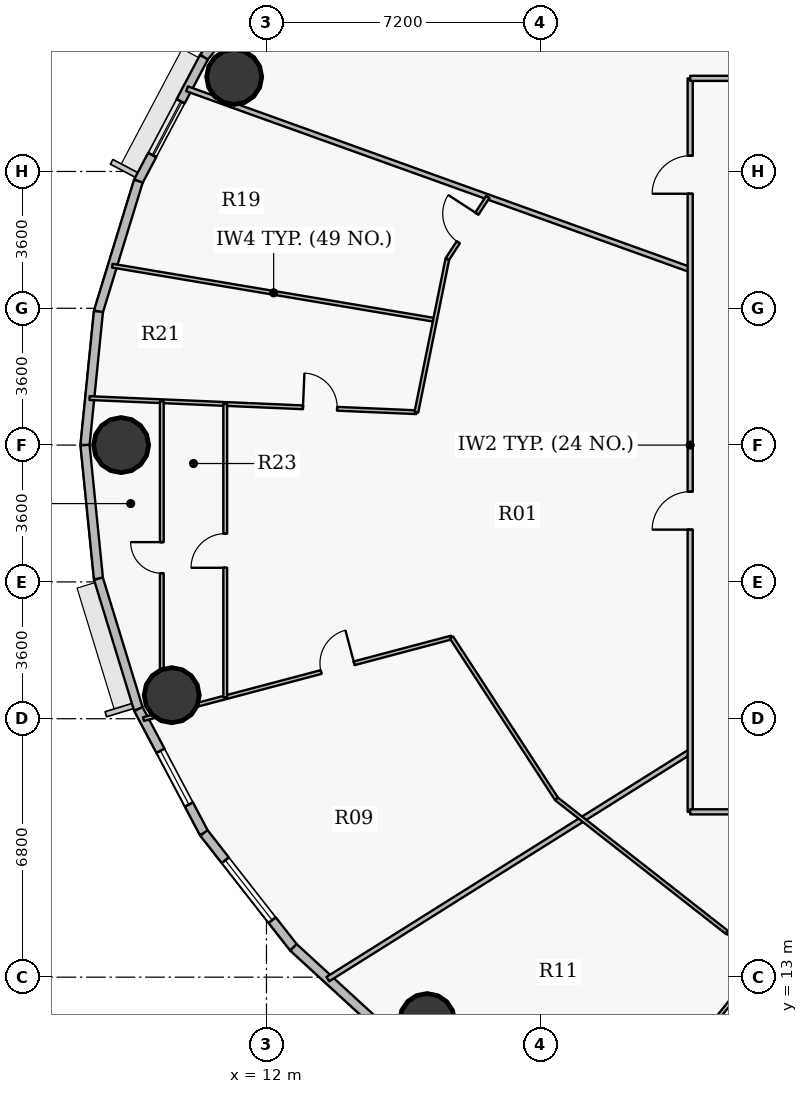
"""IFC4 building model, lengths in metres.
Left out: names, types, materials, properties, quantities, classifications, styles, units other than length and angle.
Written with IfcOpenShell. Run it as: python <this file> out.ifc"""

import sys

from ifc_helpers import new_model, si_unit, direction, frame, frame_2d, origin, origin_2d, place, context, subcontext, project, spatial, rectangle, hollow_circle, extrude, source, transform, mapped, element, fill, save


model = new_model("IFC4")
c1 = context("Model", 3, precision=1e-05, world=origin(), true_north=direction((0.0, 1.0)))
c2 = subcontext(c1, "Body", "Model", "MODEL_VIEW")
j1 = project(units=[si_unit("LENGTHUNIT", "METRE"), si_unit("PLANEANGLEUNIT", "RADIAN")], contexts=[c1])
p1 = place(None, origin())
s1 = spatial("IfcSite", under=j1, at=p1, CompositionType="ELEMENT")
p2 = place(p1, origin())
s2 = spatial("IfcBuilding", under=s1, at=p2, CompositionType="ELEMENT")
p3 = place(p2, frame((0.0, 0.0, 123.45)))
s3 = spatial("IfcBuildingStorey", under=s2, at=p3, CompositionType="ELEMENT", Elevation=123.45)
for number, where, z_axis, x_axis in (
    (1, (11.151, 36.688, 0.0), (0.0, 0.0, 1.0), (1.0, 0.0, 0.0)),
    (2, (8.175, 27.0, 0.0), (0.0, 0.0, 1.0), (1.0, 0.0, 0.0)),
    (3, (9.507, 20.419, 0.0), (0.0, 0.0, 1.0), (1.0, 0.0, 0.0)),
    (4, (16.227, 11.844, 0.0), (0.0, 0.0, 1.0), (1.0, 0.0, 0.0)),
):
    element("IfcColumn", number, at=place(p3, frame(where, z_axis=z_axis, x_axis=x_axis)), inside=s3, PredefinedType="COLUMN", context=c2, shape_type="SweptSolid", body=[
        extrude(hollow_circle(Radius=0.725, WallThickness=0.042, at=origin_2d()), origin(), (0.0, 0.0, 1.0), 3.75),
    ])
p4 = place(p3, frame((10.355, 37.206, 0.0), z_axis=(0.0, 0.0, 1.0), x_axis=(0.616272103517, 0.787533297345, 0.0)))
e5 = element("IfcWall", 5, at=p4, inside=s3, PredefinedType="SOLIDWALL", context=c2, shape_type="SweptSolid", body=[
    extrude(rectangle(XDim=3.823, YDim=0.24, at=frame_2d((1.912, 0.0))), origin(), (0.0, 0.0, 1.0), 3.5),
])
p5 = place(p3, frame((8.63, 33.945, 0.0), z_axis=(0.0, 0.0, 1.0), x_axis=(0.467614004126, 0.883932770716, 0.0)))
e6 = element("IfcWall", 6, at=p5, inside=s3, PredefinedType="SOLIDWALL", context=c2, shape_type="SweptSolid", body=[
    extrude(rectangle(XDim=3.689, YDim=0.24, at=frame_2d((1.844, 0.0))), origin(), (0.0, 0.0, 1.0), 3.5),
])
p6 = place(p5, frame((0.778, 0.0, 0.9)))
e7 = element("IfcOpeningElement", 7, at=p6, cuts=e6, PredefinedType="OPENING", context=c2, shape_type="SweptSolid", body=[
    extrude(rectangle(XDim=1.6, YDim=1.75, at=origin_2d()), frame((0.8, 0.13, 0.875), z_axis=(0.0, -1.0, 0.0), x_axis=(1.0, 0.0, 0.0)), (0.0, 0.0, 1.0), 0.26),
])
p7 = place(p3, frame((7.578, 30.515, 0.0), z_axis=(0.0, 0.0, 1.0), x_axis=(0.293124431344, 0.956074300329, 0.0)))
e8 = element("IfcWall", 8, at=p7, inside=s3, PredefinedType="SOLIDWALL", context=c2, shape_type="SweptSolid", body=[
    extrude(rectangle(XDim=3.587, YDim=0.24, at=frame_2d((1.793, 0.0))), origin(), (0.0, 0.0, 1.0), 3.5),
])
for number, where, z_axis, x_axis in (
    (9, (7.225, 27.0, 0.0), (0.0, 0.0, 1.0), (0.1, 0.995, 0.0)),
    (10, (7.578, 23.485, 0.0), (0.0, 0.0, 1.0), (-0.1, 0.995, 0.0)),
):
    element("IfcWall", number, at=place(p3, frame(where, z_axis=z_axis, x_axis=x_axis)), inside=s3, PredefinedType="SOLIDWALL", context=c2, shape_type="SweptSolid", body=[
        extrude(rectangle(XDim=3.533, YDim=0.24, at=frame_2d((1.767, 0.0))), origin(), (0.0, 0.0, 1.0), 3.5),
    ])
p8 = place(p3, frame((8.63, 20.055, 0.0), z_axis=(0.0, 0.0, 1.0), x_axis=(-0.293124431344, 0.956074300329, 0.0)))
e11 = element("IfcWall", 11, at=p8, inside=s3, PredefinedType="SOLIDWALL", context=c2, shape_type="SweptSolid", body=[
    extrude(rectangle(XDim=3.587, YDim=0.24, at=frame_2d((1.793, 0.0))), origin(), (0.0, 0.0, 1.0), 3.5),
])
p9 = place(p3, frame((10.355, 16.794, 0.0), z_axis=(0.0, 0.0, 1.0), x_axis=(-0.467614004126, 0.883932770716, 0.0)))
e12 = element("IfcWall", 12, at=p9, inside=s3, PredefinedType="SOLIDWALL", context=c2, shape_type="SweptSolid", body=[
    extrude(rectangle(XDim=3.689, YDim=0.24, at=frame_2d((1.844, 0.0))), origin(), (0.0, 0.0, 1.0), 3.5),
])
p10 = place(p9, frame((0.846, 0.0, 0.9)))
e13 = element("IfcOpeningElement", 13, at=p10, cuts=e12, PredefinedType="OPENING", context=c2, shape_type="SweptSolid", body=[
    extrude(rectangle(XDim=1.6, YDim=1.75, at=origin_2d()), frame((0.8, 0.13, 0.875), z_axis=(0.0, -1.0, 0.0), x_axis=(1.0, 0.0, 0.0)), (0.0, 0.0, 1.0), 0.26),
])
p11 = place(p3, frame((12.711, 13.783, 0.0), z_axis=(0.0, 0.0, 1.0), x_axis=(-0.616272103517, 0.787533297345, 0.0)))
e14 = element("IfcWall", 14, at=p11, inside=s3, PredefinedType="SOLIDWALL", context=c2, shape_type="SweptSolid", body=[
    extrude(rectangle(XDim=3.823, YDim=0.24, at=frame_2d((1.912, 0.0))), origin(), (0.0, 0.0, 1.0), 3.5),
])
p12 = place(p11, frame((0.912, 0.0, 0.9)))
e15 = element("IfcOpeningElement", 15, at=p12, cuts=e14, PredefinedType="OPENING", context=c2, shape_type="SweptSolid", body=[
    extrude(rectangle(XDim=2.0, YDim=1.75, at=origin_2d()), frame((1.0, 0.13, 0.875), z_axis=(0.0, -1.0, 0.0), x_axis=(1.0, 0.0, 0.0)), (0.0, 0.0, 1.0), 0.26),
])
p13 = place(p3, frame((15.642, 11.097, 0.0), z_axis=(0.0, 0.0, 1.0), x_axis=(-0.737113356241, 0.675769117414, 0.0)))
e16 = element("IfcWall", 16, at=p13, inside=s3, PredefinedType="SOLIDWALL", context=c2, shape_type="SweptSolid", body=[
    extrude(rectangle(XDim=3.976, YDim=0.24, at=frame_2d((1.988, 0.0))), origin(), (0.0, 0.0, 1.0), 3.5),
])
p14 = place(p3, frame((7.344, 28.236, 0.0), z_axis=(0.0, 0.0, 1.0), x_axis=(0.9990704445, -0.043107388317, 0.0)))
e17 = element("IfcWall", 17, at=p14, inside=s3, PredefinedType="PARTITIONING", context=c2, shape_type="SweptSolid", body=[
    extrude(rectangle(XDim=8.609, YDim=0.1, at=frame_2d((4.304, 0.0))), origin(), (0.0, 0.0, 1.0), 2.935),
])
p15 = place(p14, frame((5.621, 0.0, 0.0)))
e18 = element("IfcOpeningElement", 18, at=p15, cuts=e17, PredefinedType="OPENING", context=c2, shape_type="SweptSolid", body=[
    extrude(rectangle(XDim=0.9, YDim=2.1, at=origin_2d()), frame((0.45, 0.06, 1.05), z_axis=(0.0, -1.0, 0.0), x_axis=(1.0, 0.0, 0.0)), (0.0, 0.0, 1.0), 0.12),
])
p16 = place(p3, frame((7.943, 31.721, 0.0), z_axis=(0.0, 0.0, 1.0), x_axis=(0.986139151265, -0.165920385556, 0.0)))
e19 = element("IfcWall", 19, at=p16, inside=s3, PredefinedType="PARTITIONING", context=c2, shape_type="SweptSolid", body=[
    extrude(rectangle(XDim=8.612, YDim=0.1, at=frame_2d((4.306, 0.0))), origin(), (0.0, 0.0, 1.0), 2.935),
])
p17 = place(p3, frame((8.763, 19.792, 0.0), z_axis=(0.0, 0.0, 1.0), x_axis=(0.96671793708, 0.255844542893, 0.0)))
e20 = element("IfcWall", 20, at=p17, inside=s3, PredefinedType="PARTITIONING", context=c2, shape_type="SweptSolid", body=[
    extrude(rectangle(XDim=8.385, YDim=0.1, at=frame_2d((4.192, 0.0))), origin(), (0.0, 0.0, 1.0), 2.935),
])
p18 = place(p17, frame((4.835, 0.0, 0.0)))
e21 = element("IfcOpeningElement", 21, at=p18, cuts=e20, PredefinedType="OPENING", context=c2, shape_type="SweptSolid", body=[
    extrude(rectangle(XDim=0.9, YDim=2.1, at=origin_2d()), frame((0.45, 0.06, 1.05), z_axis=(0.0, -1.0, 0.0), x_axis=(1.0, 0.0, 0.0)), (0.0, 0.0, 1.0), 0.12),
])
p19 = place(p3, frame((9.246, 19.919, 0.0), z_axis=(0.0, 0.0, 1.0), x_axis=(0.0, 1.0, 0.0)))
e22 = element("IfcWall", 22, at=p19, inside=s3, PredefinedType="PARTITIONING", context=c2, shape_type="SweptSolid", body=[
    extrude(rectangle(XDim=8.235, YDim=0.1, at=frame_2d((4.117, 0.0))), origin(), (0.0, 0.0, 1.0), 2.935),
])
p20 = place(p19, frame((3.708, 0.0, 0.0)))
e23 = element("IfcOpeningElement", 23, at=p20, cuts=e22, PredefinedType="OPENING", context=c2, shape_type="SweptSolid", body=[
    extrude(rectangle(XDim=0.82, YDim=2.1, at=origin_2d()), frame((0.41, 0.06, 1.05), z_axis=(0.0, -1.0, 0.0), x_axis=(1.0, 0.0, 0.0)), (0.0, 0.0, 1.0), 0.12),
])
p21 = place(p3, frame((9.91, 36.375, 0.0), z_axis=(0.0, 0.0, 1.0), x_axis=(0.941089213164, -0.338158384292, 0.0)))
e24 = element("IfcWall", 24, at=p21, inside=s3, PredefinedType="PARTITIONING", context=c2, shape_type="SweptSolid", body=[
    extrude(rectangle(XDim=14.069, YDim=0.135, at=frame_2d((7.035, 0.0))), origin(), (0.0, 0.0, 1.0), 2.935),
])
p22 = place(p3, frame((10.915, 20.361, 0.0), z_axis=(0.0, 0.0, 1.0), x_axis=(0.0, 1.0, 0.0)))
e25 = element("IfcWall", 25, at=p22, inside=s3, PredefinedType="PARTITIONING", context=c2, shape_type="SweptSolid", body=[
    extrude(rectangle(XDim=7.721, YDim=0.1, at=frame_2d((3.861, 0.0))), origin(), (0.0, 0.0, 1.0), 2.935),
])
p23 = place(p22, frame((3.411, 0.0, 0.0)))
e26 = element("IfcOpeningElement", 26, at=p23, cuts=e25, PredefinedType="OPENING", context=c2, shape_type="SweptSolid", body=[
    extrude(rectangle(XDim=0.9, YDim=2.1, at=origin_2d()), frame((0.45, 0.06, 1.05), z_axis=(0.0, -1.0, 0.0), x_axis=(1.0, 0.0, 0.0)), (0.0, 0.0, 1.0), 0.12),
])
p24 = place(p3, frame((13.615, 12.948, 0.0), z_axis=(0.0, 0.0, 1.0), x_axis=(0.846963568038, 0.531650932866, 0.0)))
e27 = element("IfcWall", 27, at=p24, inside=s3, PredefinedType="PARTITIONING", context=c2, shape_type="SweptSolid", body=[
    extrude(rectangle(XDim=11.258, YDim=0.135, at=frame_2d((5.629, 0.0))), origin(), (0.0, 0.0, 1.0), 2.935),
])
p25 = place(p3, frame((15.945, 27.865, 0.0), z_axis=(0.0, 0.0, 1.0), x_axis=(0.198216891741, 0.980158183065, 0.0)))
e28 = element("IfcWall", 28, at=p25, inside=s3, PredefinedType="PARTITIONING", context=c2, shape_type="SweptSolid", body=[
    extrude(rectangle(XDim=4.111, YDim=0.1, at=frame_2d((2.056, 0.0))), origin(), (0.0, 0.0, 1.0), 3.5),
])
p26 = place(p3, frame((16.76, 31.895, 0.0), z_axis=(0.0, 0.0, 1.0), x_axis=(0.545370803514, 0.838194897786, 0.0)))
e29 = element("IfcWall", 29, at=p26, inside=s3, PredefinedType="PARTITIONING", context=c2, shape_type="SweptSolid", body=[
    extrude(rectangle(XDim=1.952, YDim=0.1, at=frame_2d((0.976, 0.0))), origin(), (0.0, 0.0, 1.0), 3.5),
])
p27 = place(p26, frame((0.526, 0.0, 0.0)))
e30 = element("IfcOpeningElement", 30, at=p27, cuts=e29, PredefinedType="OPENING", context=c2, shape_type="SweptSolid", body=[
    extrude(rectangle(XDim=0.9, YDim=2.1, at=origin_2d()), frame((0.45, 0.06, 1.05), z_axis=(0.0, -1.0, 0.0), x_axis=(1.0, 0.0, 0.0)), (0.0, 0.0, 1.0), 0.12),
])
p28 = place(p3, frame((16.869, 21.937, 0.0), z_axis=(0.0, 0.0, 1.0), x_axis=(0.545394651961, -0.838179380331, 0.0)))
e31 = element("IfcWall", 31, at=p28, inside=s3, PredefinedType="PARTITIONING", context=c2, shape_type="SweptSolid", body=[
    extrude(rectangle(XDim=5.068, YDim=0.1, at=frame_2d((2.534, 0.0))), origin(), (0.0, 0.0, 1.0), 3.5),
])
p29 = place(p3, frame((19.634, 17.689, 0.0), z_axis=(0.0, 0.0, 1.0), x_axis=(0.787333679705, -0.616527109544, 0.0)))
e32 = element("IfcWall", 32, at=p29, inside=s3, PredefinedType="PARTITIONING", context=c2, shape_type="SweptSolid", body=[
    extrude(rectangle(XDim=5.685, YDim=0.1, at=frame_2d((2.842, 0.0))), origin(), (0.0, 0.0, 1.0), 2.935),
])
p30 = place(p3, frame((20.717, 8.007, 0.0), z_axis=(0.0, 0.0, 1.0), x_axis=(0.626926430663, 0.779078462375, 0.0)))
e33 = element("IfcWall", 33, at=p30, inside=s3, PredefinedType="PARTITIONING", context=c2, shape_type="SweptSolid", body=[
    extrude(rectangle(XDim=7.317, YDim=0.1, at=frame_2d((3.658, 0.0))), origin(), (0.0, 0.0, 1.0), 2.935),
])
p31 = place(p30, frame((3.208, 0.0, 0.0)))
e34 = element("IfcOpeningElement", 34, at=p31, cuts=e33, PredefinedType="OPENING", context=c2, shape_type="SweptSolid", body=[
    extrude(rectangle(XDim=0.9, YDim=2.1, at=origin_2d()), frame((0.45, 0.06, 1.05), z_axis=(0.0, -1.0, 0.0), x_axis=(1.0, 0.0, 0.0)), (0.0, 0.0, 1.0), 0.12),
])
p32 = place(p3, frame((23.15, 17.35, 0.0), z_axis=(0.0, 0.0, 1.0), x_axis=(0.0, 1.0, 0.0)))
e35 = element("IfcWall", 35, at=p32, inside=s3, PredefinedType="PARTITIONING", context=c2, shape_type="SweptSolid", body=[
    extrude(rectangle(XDim=19.3, YDim=0.135, at=frame_2d((9.65, 0.0))), origin(), (0.0, 0.0, 1.0), 2.935),
])
p33 = place(p32, frame((16.264, 0.0, 0.0)))
e36 = element("IfcOpeningElement", 36, at=p33, cuts=e35, PredefinedType="OPENING", context=c2, shape_type="SweptSolid", body=[
    extrude(rectangle(XDim=1.0, YDim=2.15, at=origin_2d()), frame((0.5, 0.078, 1.075), z_axis=(0.0, -1.0, 0.0), x_axis=(1.0, 0.0, 0.0)), (0.0, 0.0, 1.0), 0.155),
])
p34 = place(p32, frame((7.426, 0.0, 0.0)))
e37 = element("IfcOpeningElement", 37, at=p34, cuts=e35, PredefinedType="OPENING", context=c2, shape_type="SweptSolid", body=[
    extrude(rectangle(XDim=1.0, YDim=2.15, at=origin_2d()), frame((0.5, 0.078, 1.075), z_axis=(0.0, -1.0, 0.0), x_axis=(1.0, 0.0, 0.0)), (0.0, 0.0, 1.0), 0.155),
])
p35 = place(p3, frame((23.15, 17.35, 0.0), z_axis=(0.0, 0.0, 1.0), x_axis=(1.0, 0.0, 0.0)))
e38 = element("IfcWall", 38, at=p35, inside=s3, PredefinedType="PARTITIONING", context=c2, shape_type="SweptSolid", body=[
    extrude(rectangle(XDim=10.619, YDim=0.135, at=frame_2d((5.31, 0.0))), origin(), (0.0, 0.0, 1.0), 2.935),
])
p36 = place(p35, frame((4.211, 0.0, 0.0)))
e39 = element("IfcOpeningElement", 39, at=p36, cuts=e38, PredefinedType="OPENING", context=c2, shape_type="SweptSolid", body=[
    extrude(rectangle(XDim=1.0, YDim=2.15, at=origin_2d()), frame((0.5, 0.078, 1.075), z_axis=(0.0, -1.0, 0.0), x_axis=(1.0, 0.0, 0.0)), (0.0, 0.0, 1.0), 0.155),
])
p37 = place(p3, frame((23.15, 36.65, 0.0), z_axis=(0.0, 0.0, 1.0), x_axis=(1.0, 0.0, 0.0)))
e40 = element("IfcWall", 40, at=p37, inside=s3, PredefinedType="PARTITIONING", context=c2, shape_type="SweptSolid", body=[
    extrude(rectangle(XDim=10.612, YDim=0.135, at=frame_2d((5.306, 0.0))), origin(), (0.0, 0.0, 1.0), 2.935),
])
p38 = place(p37, frame((8.182, 0.0, 0.0)))
e41 = element("IfcOpeningElement", 41, at=p38, cuts=e40, PredefinedType="OPENING", context=c2, shape_type="SweptSolid", body=[
    extrude(rectangle(XDim=1.0, YDim=2.15, at=origin_2d()), frame((0.5, 0.078, 1.075), z_axis=(0.0, -1.0, 0.0), x_axis=(1.0, 0.0, 0.0)), (0.0, 0.0, 1.0), 0.155),
])
p39 = place(p3, frame((23.33, 47.184, 0.0), z_axis=(0.0, 0.0, 1.0), x_axis=(0.531660079213, -0.846957826678, 0.0)))
e42 = element("IfcWall", 42, at=p39, inside=s3, PredefinedType="PARTITIONING", context=c2, shape_type="SweptSolid", body=[
    extrude(rectangle(XDim=12.437, YDim=0.135, at=frame_2d((6.219, 0.0))), origin(), (0.0, 0.0, 1.0), 2.935),
])
p40 = place(p3, frame((24.109, 14.184, 0.0), z_axis=(0.0, 0.0, 1.0), x_axis=(0.928816677888, -0.370539578017, 0.0)))
e43 = element("IfcWall", 43, at=p40, inside=s3, PredefinedType="PARTITIONING", context=c2, shape_type="SweptSolid", body=[
    extrude(rectangle(XDim=1.286, YDim=0.1, at=frame_2d((0.643, 0.0))), origin(), (0.0, 0.0, 1.0), 3.085),
])
m1 = source(origin(), c2, "Body", "SweptSolid", [
    extrude(rectangle(XDim=1.6, YDim=1.75, at=origin_2d()), frame((0.8, 0.03, 0.875), z_axis=(0.0, -1.0, 0.0), x_axis=(1.0, 0.0, 0.0)), (0.0, 0.0, 1.0), 0.06),
])
p41 = place(p6, origin())
e44 = element("IfcWindow", 44, at=p41, inside=s3, PartitioningType="DOUBLE_PANEL_VERTICAL", PredefinedType="WINDOW", context=c2, shape_type="MappedRepresentation", body=[
    mapped(m1, transform((0.0, 0.0, 0.0), x_axis=(1.0, 0.0, 0.0), y_axis=(0.0, 1.0, 0.0), z_axis=(0.0, 0.0, 1.0), scale=1.0)),
])
fill(e7, e44)
p42 = place(p10, origin())
e45 = element("IfcWindow", 45, at=p42, inside=s3, PartitioningType="DOUBLE_PANEL_VERTICAL", PredefinedType="WINDOW", context=c2, shape_type="MappedRepresentation", body=[
    mapped(m1, transform((0.0, 0.0, 0.0), x_axis=(1.0, 0.0, 0.0), y_axis=(0.0, 1.0, 0.0), z_axis=(0.0, 0.0, 1.0), scale=1.0)),
])
fill(e13, e45)
m2 = source(origin(), c2, "Body", "SweptSolid", [
    extrude(rectangle(XDim=2.0, YDim=1.75, at=origin_2d()), frame((1.0, 0.03, 0.875), z_axis=(0.0, -1.0, 0.0), x_axis=(1.0, 0.0, 0.0)), (0.0, 0.0, 1.0), 0.06),
])
p43 = place(p12, origin())
e46 = element("IfcWindow", 46, at=p43, inside=s3, PartitioningType="DOUBLE_PANEL_VERTICAL", PredefinedType="WINDOW", context=c2, shape_type="MappedRepresentation", body=[
    mapped(m2, transform((0.0, 0.0, 0.0), x_axis=(1.0, 0.0, 0.0), y_axis=(0.0, 1.0, 0.0), z_axis=(0.0, 0.0, 1.0), scale=1.0)),
])
fill(e15, e46)
m3 = source(origin(), c2, "Body", "SweptSolid", [
    extrude(rectangle(XDim=1.0, YDim=2.15, at=origin_2d()), frame((0.5, 0.025, 1.075), z_axis=(0.0, -1.0, 0.0), x_axis=(1.0, 0.0, 0.0)), (0.0, 0.0, 1.0), 0.05),
])
p44 = place(p33, origin())
e47 = element("IfcDoor", 47, at=p44, inside=s3, OperationType="SINGLE_SWING_LEFT", PredefinedType="DOOR", context=c2, shape_type="MappedRepresentation", body=[
    mapped(m3, transform((0.0, 0.0, 0.0), x_axis=(1.0, 0.0, 0.0), y_axis=(0.0, 1.0, 0.0), z_axis=(0.0, 0.0, 1.0), scale=1.0)),
])
fill(e36, e47)
p45 = place(p34, origin())
e48 = element("IfcDoor", 48, at=p45, inside=s3, OperationType="SINGLE_SWING_LEFT", PredefinedType="DOOR", context=c2, shape_type="MappedRepresentation", body=[
    mapped(m3, transform((0.0, 0.0, 0.0), x_axis=(1.0, 0.0, 0.0), y_axis=(0.0, 1.0, 0.0), z_axis=(0.0, 0.0, 1.0), scale=1.0)),
])
fill(e37, e48)
m4 = source(origin(), c2, "Body", "SweptSolid", [
    extrude(rectangle(XDim=0.9, YDim=2.1, at=origin_2d()), frame((0.45, 0.025, 1.05), z_axis=(0.0, -1.0, 0.0), x_axis=(1.0, 0.0, 0.0)), (0.0, 0.0, 1.0), 0.05),
])
p46 = place(p27, origin())
e49 = element("IfcDoor", 49, at=p46, inside=s3, OperationType="SINGLE_SWING_RIGHT", PredefinedType="DOOR", context=c2, shape_type="MappedRepresentation", body=[
    mapped(m4, transform((0.0, 0.0, 0.0), x_axis=(1.0, 0.0, 0.0), y_axis=(0.0, 1.0, 0.0), z_axis=(0.0, 0.0, 1.0), scale=1.0)),
])
fill(e30, e49)
p47 = place(p15, origin())
e50 = element("IfcDoor", 50, at=p47, inside=s3, OperationType="SINGLE_SWING_LEFT", PredefinedType="DOOR", context=c2, shape_type="MappedRepresentation", body=[
    mapped(m4, transform((0.0, 0.0, 0.0), x_axis=(1.0, 0.0, 0.0), y_axis=(0.0, 1.0, 0.0), z_axis=(0.0, 0.0, 1.0), scale=1.0)),
])
fill(e18, e50)
p48 = place(p18, origin())
e51 = element("IfcDoor", 51, at=p48, inside=s3, OperationType="SINGLE_SWING_RIGHT", PredefinedType="DOOR", context=c2, shape_type="MappedRepresentation", body=[
    mapped(m4, transform((0.0, 0.0, 0.0), x_axis=(1.0, 0.0, 0.0), y_axis=(0.0, 1.0, 0.0), z_axis=(0.0, 0.0, 1.0), scale=1.0)),
])
fill(e21, e51)
p49 = place(p23, origin())
e52 = element("IfcDoor", 52, at=p49, inside=s3, OperationType="SINGLE_SWING_LEFT", PredefinedType="DOOR", context=c2, shape_type="MappedRepresentation", body=[
    mapped(m4, transform((0.0, 0.0, 0.0), x_axis=(1.0, 0.0, 0.0), y_axis=(0.0, 1.0, 0.0), z_axis=(0.0, 0.0, 1.0), scale=1.0)),
])
fill(e26, e52)
m5 = source(origin(), c2, "Body", "SweptSolid", [
    extrude(rectangle(XDim=0.82, YDim=2.1, at=origin_2d()), frame((0.41, 0.025, 1.05), z_axis=(0.0, -1.0, 0.0), x_axis=(1.0, 0.0, 0.0)), (0.0, 0.0, 1.0), 0.05),
])
p50 = place(p20, origin())
e53 = element("IfcDoor", 53, at=p50, inside=s3, OperationType="SINGLE_SWING_RIGHT", PredefinedType="DOOR", context=c2, shape_type="MappedRepresentation", body=[
    mapped(m5, transform((0.0, 0.0, 0.0), x_axis=(1.0, 0.0, 0.0), y_axis=(0.0, 1.0, 0.0), z_axis=(0.0, 0.0, 1.0), scale=1.0)),
])
fill(e23, e53)
save(model, sys.argv[1])
